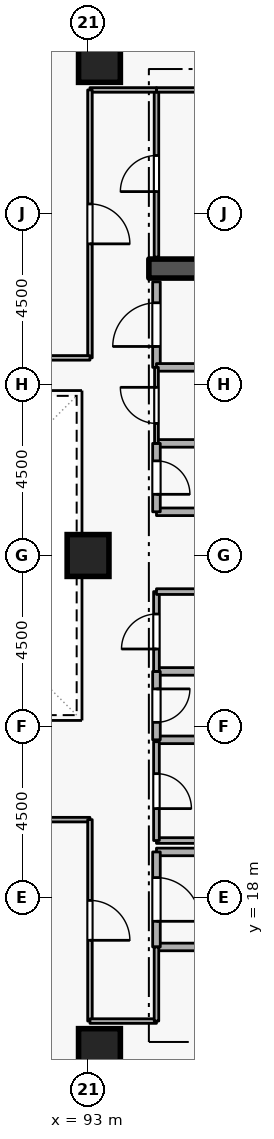
"""IFC4 building model, lengths in metres.
Left out: names, types, materials, properties, quantities, classifications, styles, units other than length and angle.
Written with IfcOpenShell. Run it as: python <this file> out.ifc"""

import sys

from ifc_helpers import new_model, si_unit, direction, frame, frame_2d, origin, origin_2d, place, context, subcontext, project, spatial, rectangle, extrude, element, fill, save


model = new_model("IFC4")
c1 = context("Model", 3, precision=1e-05, world=origin(), true_north=direction((0.0, 1.0)))
c2 = subcontext(c1, "Body", "Model", "MODEL_VIEW")
j1 = project(units=[si_unit("LENGTHUNIT", "METRE"), si_unit("PLANEANGLEUNIT", "RADIAN")], contexts=[c1])
p1 = place(None, origin())
s1 = spatial("IfcSite", under=j1, at=p1, CompositionType="ELEMENT")
p2 = place(p1, origin())
s2 = spatial("IfcBuilding", under=s1, at=p2, CompositionType="ELEMENT")
p3 = place(p2, frame((0.0, 0.0, 149.1)))
s3 = spatial("IfcBuildingStorey", under=s2, at=p3, CompositionType="ELEMENT", Elevation=149.1)
p4 = place(p3, frame((94.6, 34.55, 0.0), z_axis=(0.0, 0.0, 1.0), x_axis=(1.0, 0.0, 0.0)))
e1 = element("IfcWall", 1, at=p4, inside=s3, PredefinedType="SHEAR", context=c2, shape_type="SweptSolid", body=[
    extrude(rectangle(XDim=5.8, YDim=0.5, at=frame_2d((2.9, 0.0))), origin(), (0.0, 0.0, 1.0), 3.6),
])
for number, where, z_axis, x_axis in (
    (2, (93.3, 14.0, 0.0), (0.0, 0.0, 1.0), (1.0, 0.0, 0.0)),
    (3, (93.3, 40.0, 0.0), (0.0, 0.0, 1.0), (1.0, 0.0, 0.0)),
    (4, (93.0, 27.0, 0.0), (0.0, 0.0, 1.0), (1.0, 0.0, 0.0)),
):
    element("IfcColumn", number, at=place(p3, frame(where, z_axis=z_axis, x_axis=x_axis)), inside=s3, PredefinedType="COLUMN", context=c2, shape_type="SweptSolid", body=[
        extrude(rectangle(XDim=1.1, YDim=1.1, at=origin_2d()), origin(), (0.0, 0.0, 1.0), 3.6),
    ])
p5 = place(p3, frame((94.8, 16.7, 0.0), z_axis=(0.0, 0.0, 1.0), x_axis=(1.0, 0.0, 0.0)))
e5 = element("IfcWall", 5, at=p5, inside=s3, PredefinedType="STANDARD", context=c2, shape_type="SweptSolid", body=[
    extrude(rectangle(XDim=5.7, YDim=0.2, at=frame_2d((2.85, 0.0))), origin(), (0.0, 0.0, 1.0), 3.3),
])
p6 = place(p3, frame((97.1, 19.2, 0.0), z_axis=(0.0, 0.0, 1.0), x_axis=(-1.0, 0.0, 0.0)))
e6 = element("IfcWall", 6, at=p6, inside=s3, PredefinedType="STANDARD", context=c2, shape_type="SweptSolid", body=[
    extrude(rectangle(XDim=2.3, YDim=0.2, at=frame_2d((1.15, 0.0))), origin(), (0.0, 0.0, 1.0), 2.505),
])
p7 = place(p3, frame((94.8, 19.2, 0.0), z_axis=(0.0, 0.0, 1.0), x_axis=(0.0, -1.0, 0.0)))
e7 = element("IfcWall", 7, at=p7, inside=s3, PredefinedType="STANDARD", context=c2, shape_type="SweptSolid", body=[
    extrude(rectangle(XDim=2.5, YDim=0.2, at=frame_2d((1.25, 0.0))), origin(), (0.0, 0.0, 1.0), 3.3),
])
p8 = place(p7, frame((0.675, 0.0, 0.0)))
e8 = element("IfcOpeningElement", 8, at=p8, cuts=e7, PredefinedType="OPENING", context=c2, shape_type="SweptSolid", body=[
    extrude(rectangle(XDim=1.15, YDim=2.1, at=frame_2d((0.575, 1.05))), frame((0.0, 0.11, 0.0), z_axis=(0.0, -1.0, 0.0), x_axis=(1.0, 0.0, 0.0)), (0.0, 0.0, 1.0), 0.22),
])
for number, where, z_axis, x_axis in (
    (9, (94.8, 28.15, 0.0), (0.0, 0.0, 1.0), (1.0, 0.0, 0.0)),
    (10, (96.85, 29.95, 0.0), (0.0, 0.0, 1.0), (-1.0, 0.0, 0.0)),
):
    element("IfcWall", number, at=place(p3, frame(where, z_axis=z_axis, x_axis=x_axis)), inside=s3, PredefinedType="STANDARD", context=c2, shape_type="SweptSolid", body=[
        extrude(rectangle(XDim=2.05, YDim=0.2, at=frame_2d((1.025, 0.0))), origin(), (0.0, 0.0, 1.0), 3.3),
    ])
p9 = place(p3, frame((94.8, 29.95, 0.0), z_axis=(0.0, 0.0, 1.0), x_axis=(0.0, -1.0, 0.0)))
e11 = element("IfcWall", 11, at=p9, inside=s3, PredefinedType="STANDARD", context=c2, shape_type="SweptSolid", body=[
    extrude(rectangle(XDim=1.8, YDim=0.2, at=frame_2d((0.9, 0.0))), origin(), (0.0, 0.0, 1.0), 3.3),
])
p10 = place(p9, frame((0.46, 0.0, 0.0)))
e12 = element("IfcOpeningElement", 12, at=p10, cuts=e11, PredefinedType="OPENING", context=c2, shape_type="SweptSolid", body=[
    extrude(rectangle(XDim=0.88, YDim=2.04, at=frame_2d((0.44, 1.02))), frame((0.0, 0.11, 0.0), z_axis=(0.0, -1.0, 0.0), x_axis=(1.0, 0.0, 0.0)), (0.0, 0.0, 1.0), 0.22),
])
for number, where, z_axis, x_axis in (
    (13, (94.8, 22.15, 0.0), (0.0, 0.0, 1.0), (1.0, 0.0, 0.0)),
    (14, (96.85, 23.95, 0.0), (0.0, 0.0, 1.0), (-1.0, 0.0, 0.0)),
):
    element("IfcWall", number, at=place(p3, frame(where, z_axis=z_axis, x_axis=x_axis)), inside=s3, PredefinedType="STANDARD", context=c2, shape_type="SweptSolid", body=[
        extrude(rectangle(XDim=2.05, YDim=0.2, at=frame_2d((1.025, 0.0))), origin(), (0.0, 0.0, 1.0), 3.3),
    ])
p11 = place(p3, frame((94.8, 23.95, 0.0), z_axis=(0.0, 0.0, 1.0), x_axis=(0.0, -1.0, 0.0)))
e15 = element("IfcWall", 15, at=p11, inside=s3, PredefinedType="STANDARD", context=c2, shape_type="SweptSolid", body=[
    extrude(rectangle(XDim=1.8, YDim=0.2, at=frame_2d((0.9, 0.0))), origin(), (0.0, 0.0, 1.0), 3.3),
])
p12 = place(p11, frame((0.46, 0.0, 0.0)))
e16 = element("IfcOpeningElement", 16, at=p12, cuts=e15, PredefinedType="OPENING", context=c2, shape_type="SweptSolid", body=[
    extrude(rectangle(XDim=0.88, YDim=2.04, at=frame_2d((0.44, 1.02))), frame((0.0, 0.11, 0.0), z_axis=(0.0, -1.0, 0.0), x_axis=(1.0, 0.0, 0.0)), (0.0, 0.0, 1.0), 0.22),
])
p13 = place(p3, frame((94.8, 31.95, 0.0), z_axis=(0.0, 0.0, 1.0), x_axis=(0.0, 1.0, 0.0)))
e17 = element("IfcWall", 17, at=p13, inside=s3, PredefinedType="STANDARD", context=c2, shape_type="SweptSolid", body=[
    extrude(rectangle(XDim=2.25, YDim=0.2, at=frame_2d((1.125, 0.0))), origin(), (0.0, 0.0, 1.0), 3.3),
])
p14 = place(p13, frame((0.55, 0.0, 0.0)))
e18 = element("IfcOpeningElement", 18, at=p14, cuts=e17, PredefinedType="OPENING", context=c2, shape_type="SweptSolid", body=[
    extrude(rectangle(XDim=1.15, YDim=2.1, at=frame_2d((0.575, 1.05))), frame((0.0, 0.11, 0.0), z_axis=(0.0, -1.0, 0.0), x_axis=(1.0, 0.0, 0.0)), (0.0, 0.0, 1.0), 0.22),
])
p15 = place(p3, frame((96.85, 31.95, 0.0), z_axis=(0.0, 0.0, 1.0), x_axis=(-1.0, 0.0, 0.0)))
e19 = element("IfcWall", 19, at=p15, inside=s3, PredefinedType="STANDARD", context=c2, shape_type="SweptSolid", body=[
    extrude(rectangle(XDim=2.05, YDim=0.2, at=frame_2d((1.025, 0.0))), origin(), (0.0, 0.0, 1.0), 3.3),
])
p16 = place(p3, frame((94.8, 19.5, 0.0), z_axis=(0.0, 0.0, 1.0), x_axis=(1.0, 0.0, 0.0)))
e20 = element("IfcWall", 20, at=p16, inside=s3, PredefinedType="PARTITIONING", context=c2, shape_type="SweptSolid", body=[
    extrude(rectangle(XDim=2.05, YDim=0.15, at=frame_2d((1.025, 0.0))), origin(), (0.0, 0.0, 1.0), 2.505),
])
p17 = place(p3, frame((94.8, 22.1, 0.0), z_axis=(0.0, 0.0, 1.0), x_axis=(0.0, -1.0, 0.0)))
e21 = element("IfcWall", 21, at=p17, inside=s3, PredefinedType="PARTITIONING", context=c2, shape_type="SweptSolid", body=[
    extrude(rectangle(XDim=2.6, YDim=0.15, at=frame_2d((1.3, 0.0))), origin(), (0.0, 0.0, 1.0), 3.3),
])
p18 = place(p17, frame((0.84, 0.0, 0.0)))
e22 = element("IfcOpeningElement", 22, at=p18, cuts=e21, PredefinedType="OPENING", context=c2, shape_type="SweptSolid", body=[
    extrude(rectangle(XDim=0.92, YDim=2.08, at=frame_2d((0.46, 1.04))), frame((0.0, 0.085, 0.0), z_axis=(0.0, -1.0, 0.0), x_axis=(1.0, 0.0, 0.0)), (0.0, 0.0, 1.0), 0.17),
])
p19 = place(p3, frame((94.8, 23.95, 0.0), z_axis=(0.0, 0.0, 1.0), x_axis=(0.0, 1.0, 0.0)))
e23 = element("IfcWall", 23, at=p19, inside=s3, PredefinedType="PARTITIONING", context=c2, shape_type="SweptSolid", body=[
    extrude(rectangle(XDim=2.1, YDim=0.15, at=frame_2d((1.05, 0.0))), origin(), (0.0, 0.0, 1.0), 3.3),
])
p20 = place(p19, frame((0.59, 0.0, 0.0)))
e24 = element("IfcOpeningElement", 24, at=p20, cuts=e23, PredefinedType="OPENING", context=c2, shape_type="SweptSolid", body=[
    extrude(rectangle(XDim=0.92, YDim=2.08, at=frame_2d((0.46, 1.04))), frame((0.0, 0.085, 0.0), z_axis=(0.0, -1.0, 0.0), x_axis=(1.0, 0.0, 0.0)), (0.0, 0.0, 1.0), 0.17),
])
p21 = place(p3, frame((94.8, 26.05, 0.0), z_axis=(0.0, 0.0, 1.0), x_axis=(1.0, 0.0, 0.0)))
e25 = element("IfcWall", 25, at=p21, inside=s3, PredefinedType="PARTITIONING", context=c2, shape_type="SweptSolid", body=[
    extrude(rectangle(XDim=2.05, YDim=0.15, at=frame_2d((1.025, 0.0))), origin(), (0.0, 0.0, 1.0), 3.3),
])
p22 = place(p3, frame((94.8, 29.95, 0.0), z_axis=(0.0, 0.0, 1.0), x_axis=(0.0, 1.0, 0.0)))
e26 = element("IfcWall", 26, at=p22, inside=s3, PredefinedType="PARTITIONING", context=c2, shape_type="SweptSolid", body=[
    extrude(rectangle(XDim=2.0, YDim=0.1, at=frame_2d((1.0, 0.0))), origin(), (0.0, 0.0, 1.0), 3.3),
])
p23 = place(p22, frame((0.525, 0.0, 0.0)))
e27 = element("IfcOpeningElement", 27, at=p23, cuts=e26, PredefinedType="OPENING", context=c2, shape_type="SweptSolid", body=[
    extrude(rectangle(XDim=0.95, YDim=2.1, at=frame_2d((0.475, 1.05))), frame((0.0, 0.06, 0.0), z_axis=(0.0, -1.0, 0.0), x_axis=(1.0, 0.0, 0.0)), (0.0, 0.0, 1.0), 0.12),
])
p24 = place(p3, frame((94.8, 34.85, 0.0), z_axis=(0.0, 0.0, 1.0), x_axis=(0.0, 1.0, 0.0)))
e28 = element("IfcWall", 28, at=p24, inside=s3, PredefinedType="PARTITIONING", context=c2, shape_type="SweptSolid", body=[
    extrude(rectangle(XDim=4.4, YDim=0.12, at=frame_2d((2.2, 0.0))), origin(), (0.0, 0.0, 1.0), 3.3),
])
p25 = place(p24, frame((1.725, 0.0, 0.0)))
e29 = element("IfcOpeningElement", 29, at=p25, cuts=e28, PredefinedType="OPENING", context=c2, shape_type="SweptSolid", body=[
    extrude(rectangle(XDim=0.95, YDim=2.1, at=frame_2d((0.475, 1.05))), frame((0.0, 0.07, 0.0), z_axis=(0.0, -1.0, 0.0), x_axis=(1.0, 0.0, 0.0)), (0.0, 0.0, 1.0), 0.14),
])
p26 = place(p3, frame((94.8, 39.25, 0.0), z_axis=(0.0, 0.0, 1.0), x_axis=(1.0, 0.0, 0.0)))
e30 = element("IfcWall", 30, at=p26, inside=s3, PredefinedType="PARTITIONING", context=c2, shape_type="SweptSolid", body=[
    extrude(rectangle(XDim=5.65, YDim=0.12, at=frame_2d((2.825, 0.0))), origin(), (0.0, 0.0, 1.0), 3.3),
])
p27 = place(p3, frame((88.5, 20.05, 0.0), z_axis=(0.0, 0.0, 1.0), x_axis=(1.0, 0.0, 0.0)))
e31 = element("IfcWall", 31, at=p27, inside=s3, PredefinedType="PARTITIONING", context=c2, shape_type="SweptSolid", body=[
    extrude(rectangle(XDim=4.55, YDim=0.12, at=frame_2d((2.275, 0.0))), origin(), (0.0, 0.0, 1.0), 3.3),
])
p28 = place(p3, frame((93.05, 20.05, 0.0), z_axis=(0.0, 0.0, 1.0), x_axis=(0.0, -1.0, 0.0)))
e32 = element("IfcWall", 32, at=p28, inside=s3, PredefinedType="PARTITIONING", context=c2, shape_type="SweptSolid", body=[
    extrude(rectangle(XDim=5.3, YDim=0.12, at=frame_2d((2.65, 0.0))), origin(), (0.0, 0.0, 1.0), 3.3),
])
p29 = place(p28, frame((2.125, 0.0, 0.0)))
e33 = element("IfcOpeningElement", 33, at=p29, cuts=e32, PredefinedType="OPENING", context=c2, shape_type="SweptSolid", body=[
    extrude(rectangle(XDim=1.05, YDim=2.1, at=frame_2d((0.525, 1.05))), frame((0.0, 0.07, 0.0), z_axis=(0.0, -1.0, 0.0), x_axis=(1.0, 0.0, 0.0)), (0.0, 0.0, 1.0), 0.14),
])
p30 = place(p3, frame((93.05, 14.75, 0.0), z_axis=(0.0, 0.0, 1.0), x_axis=(1.0, 0.0, 0.0)))
e34 = element("IfcWall", 34, at=p30, inside=s3, PredefinedType="PARTITIONING", context=c2, shape_type="SweptSolid", body=[
    extrude(rectangle(XDim=1.75, YDim=0.12, at=frame_2d((0.875, 0.0))), origin(), (0.0, 0.0, 1.0), 3.3),
])
p31 = place(p3, frame((94.8, 14.75, 0.0), z_axis=(0.0, 0.0, 1.0), x_axis=(0.0, 1.0, 0.0)))
e35 = element("IfcWall", 35, at=p31, inside=s3, PredefinedType="PARTITIONING", context=c2, shape_type="SweptSolid", body=[
    extrude(rectangle(XDim=1.95, YDim=0.12, at=frame_2d((0.975, 0.0))), origin(), (0.0, 0.0, 1.0), 3.3),
])
p32 = place(p3, frame((94.8, 39.25, 0.0), z_axis=(0.0, 0.0, 1.0), x_axis=(-1.0, 0.0, 0.0)))
e36 = element("IfcWall", 36, at=p32, inside=s3, PredefinedType="PARTITIONING", context=c2, shape_type="SweptSolid", body=[
    extrude(rectangle(XDim=1.75, YDim=0.12, at=frame_2d((0.875, 0.0))), origin(), (0.0, 0.0, 1.0), 3.3),
])
p33 = place(p3, frame((93.05, 39.25, 0.0), z_axis=(0.0, 0.0, 1.0), x_axis=(0.0, -1.0, 0.0)))
e37 = element("IfcWall", 37, at=p33, inside=s3, PredefinedType="PARTITIONING", context=c2, shape_type="SweptSolid", body=[
    extrude(rectangle(XDim=7.05, YDim=0.12, at=frame_2d((3.525, 0.0))), origin(), (0.0, 0.0, 1.0), 3.3),
])
p34 = place(p33, frame((3.0, 0.0, 0.0)))
e38 = element("IfcOpeningElement", 38, at=p34, cuts=e37, PredefinedType="OPENING", context=c2, shape_type="SweptSolid", body=[
    extrude(rectangle(XDim=1.05, YDim=2.1, at=frame_2d((0.525, 1.05))), frame((0.0, 0.07, 0.0), z_axis=(0.0, -1.0, 0.0), x_axis=(1.0, 0.0, 0.0)), (0.0, 0.0, 1.0), 0.14),
])
p35 = place(p3, frame((93.05, 32.2, 0.0), z_axis=(0.0, 0.0, 1.0), x_axis=(-1.0, 0.0, 0.0)))
e39 = element("IfcWall", 39, at=p35, inside=s3, PredefinedType="PARTITIONING", context=c2, shape_type="SweptSolid", body=[
    extrude(rectangle(XDim=4.55, YDim=0.12, at=frame_2d((2.275, 0.0))), origin(), (0.0, 0.0, 1.0), 3.3),
])
p36 = place(p8, origin())
e40 = element("IfcDoor", 40, at=p36, inside=s3, OperationType="SINGLE_SWING_RIGHT", PredefinedType="DOOR", context=c2, shape_type="SweptSolid", body=[
    extrude(rectangle(XDim=1.15, YDim=2.1, at=frame_2d((0.575, 1.05))), frame((0.0, 0.025, 0.0), z_axis=(0.0, -1.0, 0.0), x_axis=(1.0, 0.0, 0.0)), (0.0, 0.0, 1.0), 0.05),
])
fill(e8, e40)
p37 = place(p10, origin())
e41 = element("IfcDoor", 41, at=p37, inside=s3, OperationType="SINGLE_SWING_RIGHT", PredefinedType="DOOR", context=c2, shape_type="SweptSolid", body=[
    extrude(rectangle(XDim=0.88, YDim=2.04, at=frame_2d((0.44, 1.02))), frame((0.0, 0.025, 0.0), z_axis=(0.0, -1.0, 0.0), x_axis=(1.0, 0.0, 0.0)), (0.0, 0.0, 1.0), 0.05),
])
fill(e12, e41)
p38 = place(p12, origin())
e42 = element("IfcDoor", 42, at=p38, inside=s3, OperationType="SINGLE_SWING_LEFT", PredefinedType="DOOR", context=c2, shape_type="SweptSolid", body=[
    extrude(rectangle(XDim=0.88, YDim=2.04, at=frame_2d((0.44, 1.02))), frame((0.0, 0.025, 0.0), z_axis=(0.0, -1.0, 0.0), x_axis=(1.0, 0.0, 0.0)), (0.0, 0.0, 1.0), 0.05),
])
fill(e16, e42)
p39 = place(p18, origin())
e43 = element("IfcDoor", 43, at=p39, inside=s3, OperationType="SINGLE_SWING_RIGHT", PredefinedType="DOOR", context=c2, shape_type="SweptSolid", body=[
    extrude(rectangle(XDim=0.92, YDim=2.08, at=frame_2d((0.46, 1.04))), frame((0.0, 0.025, 0.0), z_axis=(0.0, -1.0, 0.0), x_axis=(1.0, 0.0, 0.0)), (0.0, 0.0, 1.0), 0.05),
])
fill(e22, e43)
p40 = place(p20, origin())
e44 = element("IfcDoor", 44, at=p40, inside=s3, OperationType="SINGLE_SWING_LEFT", PredefinedType="DOOR", context=c2, shape_type="SweptSolid", body=[
    extrude(rectangle(XDim=0.92, YDim=2.08, at=frame_2d((0.46, 1.04))), frame((0.0, 0.025, 0.0), z_axis=(0.0, -1.0, 0.0), x_axis=(1.0, 0.0, 0.0)), (0.0, 0.0, 1.0), 0.05),
])
fill(e24, e44)
p41 = place(p23, origin())
e45 = element("IfcDoor", 45, at=p41, inside=s3, OperationType="SINGLE_SWING_RIGHT", PredefinedType="DOOR", context=c2, shape_type="SweptSolid", body=[
    extrude(rectangle(XDim=0.95, YDim=2.1, at=frame_2d((0.475, 1.05))), frame((0.0, 0.025, 0.0), z_axis=(0.0, -1.0, 0.0), x_axis=(1.0, 0.0, 0.0)), (0.0, 0.0, 1.0), 0.05),
])
fill(e27, e45)
p42 = place(p14, origin())
e46 = element("IfcDoor", 46, at=p42, inside=s3, OperationType="SINGLE_SWING_LEFT", PredefinedType="DOOR", context=c2, shape_type="SweptSolid", body=[
    extrude(rectangle(XDim=1.15, YDim=2.1, at=frame_2d((0.575, 1.05))), frame((0.0, 0.025, 0.0), z_axis=(0.0, -1.0, 0.0), x_axis=(1.0, 0.0, 0.0)), (0.0, 0.0, 1.0), 0.05),
])
fill(e18, e46)
p43 = place(p25, origin())
e47 = element("IfcDoor", 47, at=p43, inside=s3, OperationType="SINGLE_SWING_LEFT", PredefinedType="DOOR", context=c2, shape_type="SweptSolid", body=[
    extrude(rectangle(XDim=0.95, YDim=2.1, at=frame_2d((0.475, 1.05))), frame((0.0, 0.025, 0.0), z_axis=(0.0, -1.0, 0.0), x_axis=(1.0, 0.0, 0.0)), (0.0, 0.0, 1.0), 0.05),
])
fill(e29, e47)
p44 = place(p29, origin())
e48 = element("IfcDoor", 48, at=p44, inside=s3, OperationType="SINGLE_SWING_RIGHT", PredefinedType="DOOR", context=c2, shape_type="SweptSolid", body=[
    extrude(rectangle(XDim=1.05, YDim=2.1, at=frame_2d((0.525, 1.05))), frame((0.0, 0.025, 0.0), z_axis=(0.0, -1.0, 0.0), x_axis=(1.0, 0.0, 0.0)), (0.0, 0.0, 1.0), 0.05),
])
fill(e33, e48)
p45 = place(p34, origin())
e49 = element("IfcDoor", 49, at=p45, inside=s3, OperationType="SINGLE_SWING_RIGHT", PredefinedType="DOOR", context=c2, shape_type="SweptSolid", body=[
    extrude(rectangle(XDim=1.05, YDim=2.1, at=frame_2d((0.525, 1.05))), frame((0.0, 0.025, 0.0), z_axis=(0.0, -1.0, 0.0), x_axis=(1.0, 0.0, 0.0)), (0.0, 0.0, 1.0), 0.05),
])
fill(e38, e49)
save(model, sys.argv[1])
